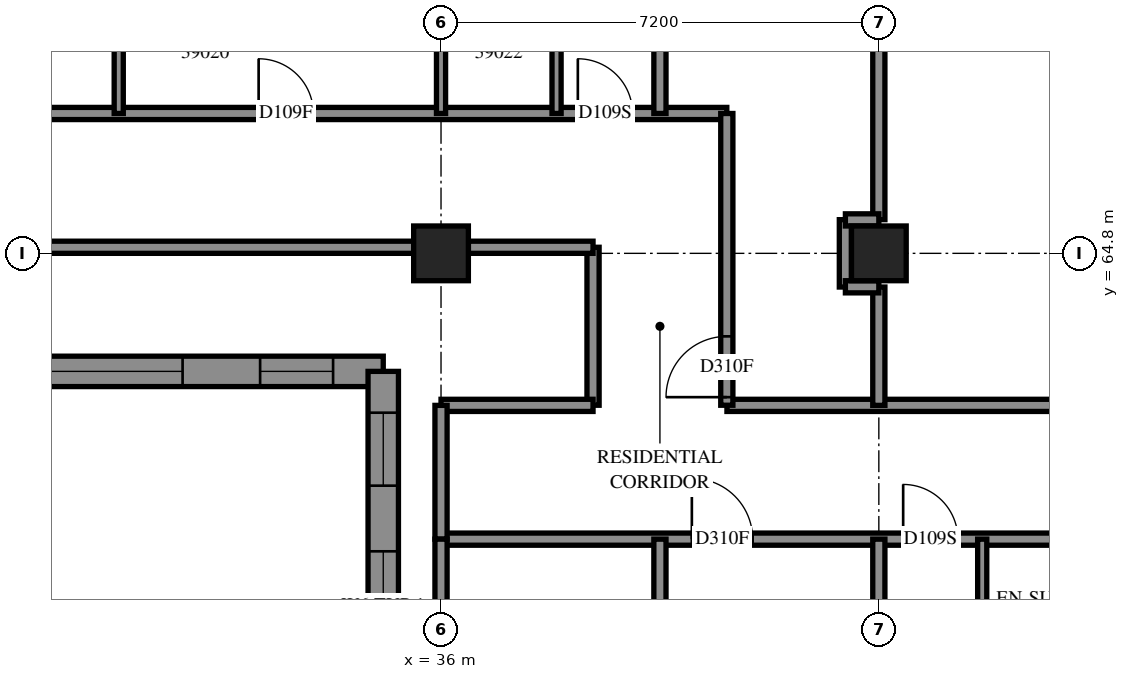
"""IFC4 building model, lengths in metres.
Left out: names, types, materials, properties, quantities, classifications, styles, units other than length and angle.
Written with IfcOpenShell. Run it as: python <this file> out.ifc"""

import sys

from ifc_helpers import new_model, si_unit, direction, frame, frame_2d, origin, origin_2d, place, context, subcontext, project, spatial, polyline, rectangle, outline, extrude, element, fill, save


model = new_model("IFC4")
c1 = context("Model", 3, precision=1e-05, world=origin(), true_north=direction((0.0, 1.0)))
c2 = subcontext(c1, "Body", "Model", "MODEL_VIEW")
j1 = project(units=[si_unit("LENGTHUNIT", "METRE"), si_unit("PLANEANGLEUNIT", "RADIAN")], contexts=[c1])
p1 = place(None, origin())
s1 = spatial("IfcSite", under=j1, at=p1, CompositionType="ELEMENT")
p2 = place(p1, origin())
s2 = spatial("IfcBuilding", under=s1, at=p2, CompositionType="ELEMENT")
p3 = place(p2, frame((0.0, 0.0, 145.6)))
s3 = spatial("IfcBuildingStorey", under=s2, at=p3, CompositionType="ELEMENT", Elevation=145.6)
for number, where, z_axis, x_axis in (
    (1, (36.0, 64.8, 0.0), (0.0, 0.0, 1.0), (1.0, 0.0, 0.0)),
    (2, (43.2, 64.8, 0.0), (0.0, 0.0, 1.0), (1.0, 0.0, 0.0)),
):
    element("IfcColumn", number, at=place(p3, frame(where, z_axis=z_axis, x_axis=x_axis)), inside=s3, PredefinedType="COLUMN", context=c2, shape_type="SweptSolid", body=[
        extrude(rectangle(XDim=0.9, YDim=0.9, at=origin_2d()), origin(), (0.0, 0.0, 1.0), 3.1),
    ])
p4 = place(p3, frame((19.659, 62.859, 0.0), z_axis=(0.0, 0.0, 1.0), x_axis=(1.0, 0.0, 0.0)))
e3 = element("IfcWall", 3, at=p4, inside=s3, PredefinedType="SOLIDWALL", context=c2, shape_type="SweptSolid", body=[
    extrude(outline(polyline([(-0.25, -0.25), (15.141, -0.25), (15.641, 0.25), (0.25, 0.25), (-0.25, -0.25)])), origin(), (0.0, 0.0, 1.0), 3.1),
])
p5 = place(p4, frame((2.341, 0.0, 0.45)))
e4 = element("IfcOpeningElement", 4, at=p5, cuts=e3, PredefinedType="OPENING", context=c2, shape_type="SweptSolid", body=[
    extrude(rectangle(XDim=2.8, YDim=2.5, at=frame_2d((1.4, 1.25))), frame((0.0, 0.26, 0.0), z_axis=(0.0, -1.0, 0.0), x_axis=(1.0, 0.0, 0.0)), (0.0, 0.0, 1.0), 0.52),
])
p6 = place(p4, frame((5.941, 0.0, 0.45)))
e5 = element("IfcOpeningElement", 5, at=p6, cuts=e3, PredefinedType="OPENING", context=c2, shape_type="SweptSolid", body=[
    extrude(rectangle(XDim=2.8, YDim=2.5, at=frame_2d((1.4, 1.25))), frame((0.0, 0.26, 0.0), z_axis=(0.0, -1.0, 0.0), x_axis=(1.0, 0.0, 0.0)), (0.0, 0.0, 1.0), 0.52),
])
p7 = place(p4, frame((9.291, 0.0, 0.45)))
e6 = element("IfcOpeningElement", 6, at=p7, cuts=e3, PredefinedType="OPENING", context=c2, shape_type="SweptSolid", body=[
    extrude(rectangle(XDim=2.8, YDim=2.5, at=frame_2d((1.4, 1.25))), frame((0.0, 0.26, 0.0), z_axis=(0.0, -1.0, 0.0), x_axis=(1.0, 0.0, 0.0)), (0.0, 0.0, 1.0), 0.52),
])
p8 = place(p4, frame((0.596, 0.0, 0.45)))
e7 = element("IfcOpeningElement", 7, at=p8, cuts=e3, PredefinedType="OPENING", context=c2, shape_type="SweptSolid", body=[
    extrude(rectangle(XDim=1.2, YDim=2.5, at=frame_2d((0.6, 1.25))), frame((0.0, 0.26, 0.0), z_axis=(0.0, -1.0, 0.0), x_axis=(1.0, 0.0, 0.0)), (0.0, 0.0, 1.0), 0.52),
])
p9 = place(p4, frame((13.366, 0.0, 0.45)))
e8 = element("IfcOpeningElement", 8, at=p9, cuts=e3, PredefinedType="OPENING", context=c2, shape_type="SweptSolid", body=[
    extrude(rectangle(XDim=1.2, YDim=2.5, at=frame_2d((0.6, 1.25))), frame((0.0, 0.26, 0.0), z_axis=(0.0, -1.0, 0.0), x_axis=(1.0, 0.0, 0.0)), (0.0, 0.0, 1.0), 0.52),
])
p10 = place(p3, frame((35.05, 62.859, 0.0), z_axis=(0.0, 0.0, 1.0), x_axis=(0.0, -1.0, 0.0)))
e9 = element("IfcWall", 9, at=p10, inside=s3, PredefinedType="SOLIDWALL", context=c2, shape_type="SweptSolid", body=[
    extrude(outline(polyline([(0.25, -0.25), (6.459, -0.25), (5.959, 0.25), (-0.25, 0.25), (0.25, -0.25)])), origin(), (0.0, 0.0, 1.0), 3.1),
])
p11 = place(p10, frame((0.679, 0.0, 0.45)))
e10 = element("IfcOpeningElement", 10, at=p11, cuts=e9, PredefinedType="OPENING", context=c2, shape_type="SweptSolid", body=[
    extrude(rectangle(XDim=1.2, YDim=2.5, at=frame_2d((0.6, 1.25))), frame((0.0, 0.26, 0.0), z_axis=(0.0, -1.0, 0.0), x_axis=(1.0, 0.0, 0.0)), (0.0, 0.0, 1.0), 0.52),
])
p12 = place(p10, frame((2.959, 0.0, 0.7)))
e11 = element("IfcOpeningElement", 11, at=p12, cuts=e9, PredefinedType="OPENING", context=c2, shape_type="SweptSolid", body=[
    extrude(rectangle(XDim=1.8, YDim=2.2, at=frame_2d((0.9, 1.1))), frame((0.0, 0.26, 0.0), z_axis=(0.0, -1.0, 0.0), x_axis=(1.0, 0.0, 0.0)), (0.0, 0.0, 1.0), 0.52),
])
p13 = place(p3, frame((21.602, 67.1, 0.0), z_axis=(0.0, 0.0, 1.0), x_axis=(1.0, 0.0, 0.0)))
e12 = element("IfcWall", 12, at=p13, inside=s3, PredefinedType="PARTITIONING", context=c2, shape_type="SweptSolid", body=[
    extrude(rectangle(XDim=19.098, YDim=0.2, at=frame_2d((9.549, 0.0))), origin(), (0.0, 0.0, 1.0), 3.1),
])
p14 = place(p13, frame((3.998, 0.0, 0.0)))
e13 = element("IfcOpeningElement", 13, at=p14, cuts=e12, PredefinedType="OPENING", context=c2, shape_type="SweptSolid", body=[
    extrude(rectangle(XDim=0.9, YDim=2.1, at=frame_2d((0.45, 1.05))), frame((0.0, 0.11, 0.0), z_axis=(0.0, -1.0, 0.0), x_axis=(1.0, 0.0, 0.0)), (0.0, 0.0, 1.0), 0.22),
])
p15 = place(p13, frame((11.399, 0.0, 0.0)))
e14 = element("IfcOpeningElement", 14, at=p15, cuts=e12, PredefinedType="OPENING", context=c2, shape_type="SweptSolid", body=[
    extrude(rectangle(XDim=0.9, YDim=2.1, at=frame_2d((0.45, 1.05))), frame((0.0, 0.11, 0.0), z_axis=(0.0, -1.0, 0.0), x_axis=(1.0, 0.0, 0.0)), (0.0, 0.0, 1.0), 0.22),
])
p16 = place(p13, frame((16.648, 0.0, 0.0)))
e15 = element("IfcOpeningElement", 15, at=p16, cuts=e12, PredefinedType="OPENING", context=c2, shape_type="SweptSolid", body=[
    extrude(rectangle(XDim=0.9, YDim=2.1, at=frame_2d((0.45, 1.05))), frame((0.0, 0.11, 0.0), z_axis=(0.0, -1.0, 0.0), x_axis=(1.0, 0.0, 0.0)), (0.0, 0.0, 1.0), 0.22),
])
p17 = place(p3, frame((36.0, 60.1, 0.0), z_axis=(0.0, 0.0, 1.0), x_axis=(1.0, 0.0, 0.0)))
e16 = element("IfcWall", 16, at=p17, inside=s3, PredefinedType="PARTITIONING", context=c2, shape_type="SweptSolid", body=[
    extrude(rectangle(XDim=16.9, YDim=0.2, at=frame_2d((8.45, 0.0))), origin(), (0.0, 0.0, 1.0), 3.1),
])
p18 = place(p17, frame((4.125, 0.0, 0.0)))
e17 = element("IfcOpeningElement", 17, at=p18, cuts=e16, PredefinedType="OPENING", context=c2, shape_type="SweptSolid", body=[
    extrude(rectangle(XDim=1.0, YDim=2.1, at=frame_2d((0.5, 1.05))), frame((0.0, 0.11, 0.0), z_axis=(0.0, -1.0, 0.0), x_axis=(1.0, 0.0, 0.0)), (0.0, 0.0, 1.0), 0.22),
])
p19 = place(p17, frame((7.6, 0.0, 0.0)))
e18 = element("IfcOpeningElement", 18, at=p19, cuts=e16, PredefinedType="OPENING", context=c2, shape_type="SweptSolid", body=[
    extrude(rectangle(XDim=0.9, YDim=2.1, at=frame_2d((0.45, 1.05))), frame((0.0, 0.11, 0.0), z_axis=(0.0, -1.0, 0.0), x_axis=(1.0, 0.0, 0.0)), (0.0, 0.0, 1.0), 0.22),
])
p20 = place(p17, frame((11.635, 0.0, 0.0)))
e19 = element("IfcOpeningElement", 19, at=p20, cuts=e16, PredefinedType="OPENING", context=c2, shape_type="SweptSolid", body=[
    extrude(rectangle(XDim=1.0, YDim=2.1, at=frame_2d((0.5, 1.05))), frame((0.0, 0.11, 0.0), z_axis=(0.0, -1.0, 0.0), x_axis=(1.0, 0.0, 0.0)), (0.0, 0.0, 1.0), 0.22),
])
p21 = place(p17, frame((15.652, 0.0, 0.0)))
e20 = element("IfcOpeningElement", 20, at=p21, cuts=e16, PredefinedType="OPENING", context=c2, shape_type="SweptSolid", body=[
    extrude(rectangle(XDim=1.0, YDim=2.1, at=frame_2d((0.5, 1.05))), frame((0.0, 0.11, 0.0), z_axis=(0.0, -1.0, 0.0), x_axis=(1.0, 0.0, 0.0)), (0.0, 0.0, 1.0), 0.22),
])
p22 = place(p3, frame((40.702, 62.3, 0.0), z_axis=(0.0, 0.0, 1.0), x_axis=(1.0, 0.0, 0.0)))
e21 = element("IfcWall", 21, at=p22, inside=s3, PredefinedType="PARTITIONING", context=c2, shape_type="SweptSolid", body=[
    extrude(rectangle(XDim=9.698, YDim=0.2, at=frame_2d((4.849, 0.0))), origin(), (0.0, 0.0, 1.0), 3.1),
])
p23 = place(p22, frame((6.198, 0.0, 0.0)))
e22 = element("IfcOpeningElement", 22, at=p23, cuts=e21, PredefinedType="OPENING", context=c2, shape_type="SweptSolid", body=[
    extrude(rectangle(XDim=1.0, YDim=2.1, at=frame_2d((0.5, 1.05))), frame((0.0, 0.11, 0.0), z_axis=(0.0, -1.0, 0.0), x_axis=(1.0, 0.0, 0.0)), (0.0, 0.0, 1.0), 0.22),
])
p24 = place(p3, frame((29.25, 64.9, 0.0), z_axis=(0.0, 0.0, 1.0), x_axis=(1.0, 0.0, 0.0)))
e23 = element("IfcWall", 23, at=p24, inside=s3, PredefinedType="PARTITIONING", context=c2, shape_type="SweptSolid", body=[
    extrude(rectangle(XDim=6.3, YDim=0.2, at=frame_2d((3.15, 0.0))), origin(), (0.0, 0.0, 1.0), 2.6),
])
p25 = place(p3, frame((43.2, 65.354, 0.0), z_axis=(0.0, 0.0, 1.0), x_axis=(0.0, 1.0, 0.0)))
e24 = element("IfcWall", 24, at=p25, inside=s3, PredefinedType="PARTITIONING", context=c2, shape_type="SweptSolid", body=[
    extrude(rectangle(XDim=6.092, YDim=0.2, at=frame_2d((3.046, 0.0))), origin(), (0.0, 0.0, 1.0), 3.1),
])
p26 = place(p3, frame((39.6, 67.1, 0.0), z_axis=(0.0, 0.0, 1.0), x_axis=(0.0, 1.0, 0.0)))
e25 = element("IfcWall", 25, at=p26, inside=s3, PredefinedType="PARTITIONING", context=c2, shape_type="SweptSolid", body=[
    extrude(rectangle(XDim=5.723, YDim=0.2, at=frame_2d((2.862, 0.0))), origin(), (0.0, 0.0, 1.0), 3.1),
])
p27 = place(p3, frame((40.7, 62.302, 0.0), z_axis=(0.0, 0.0, 1.0), x_axis=(0.0, 1.0, 0.0)))
e26 = element("IfcWall", 26, at=p27, inside=s3, PredefinedType="PARTITIONING", context=c2, shape_type="SweptSolid", body=[
    extrude(rectangle(XDim=4.798, YDim=0.2, at=frame_2d((2.399, 0.0))), origin(), (0.0, 0.0, 1.0), 3.1),
])
p28 = place(p27, frame((0.133, 0.0, 0.0)))
e27 = element("IfcOpeningElement", 27, at=p28, cuts=e26, PredefinedType="OPENING", context=c2, shape_type="SweptSolid", body=[
    extrude(rectangle(XDim=1.0, YDim=2.1, at=frame_2d((0.5, 1.05))), frame((0.0, 0.11, 0.0), z_axis=(0.0, -1.0, 0.0), x_axis=(1.0, 0.0, 0.0)), (0.0, 0.0, 1.0), 0.22),
])
p29 = place(p3, frame((39.6, 56.9, 0.0), z_axis=(0.0, 0.0, 1.0), x_axis=(0.0, 1.0, 0.0)))
e28 = element("IfcWall", 28, at=p29, inside=s3, PredefinedType="PARTITIONING", context=c2, shape_type="SweptSolid", body=[
    extrude(rectangle(XDim=3.2, YDim=0.2, at=frame_2d((1.6, 0.0))), origin(), (0.0, 0.0, 1.0), 3.1),
])
p30 = place(p3, frame((38.5, 62.302, 0.0), z_axis=(0.0, 0.0, 1.0), x_axis=(0.0, 1.0, 0.0)))
e29 = element("IfcWall", 29, at=p30, inside=s3, PredefinedType="PARTITIONING", context=c2, shape_type="SweptSolid", body=[
    extrude(rectangle(XDim=2.598, YDim=0.2, at=frame_2d((1.299, 0.0))), origin(), (0.0, 0.0, 1.0), 3.1),
])
p31 = place(p3, frame((36.0, 62.3, 0.0), z_axis=(0.0, 0.0, 1.0), x_axis=(1.0, 0.0, 0.0)))
e30 = element("IfcWall", 30, at=p31, inside=s3, PredefinedType="PARTITIONING", context=c2, shape_type="SweptSolid", body=[
    extrude(rectangle(XDim=2.5, YDim=0.2, at=frame_2d((1.25, 0.0))), origin(), (0.0, 0.0, 1.0), 3.1),
])
for number, where, z_axis, x_axis in (
    (31, (30.7, 67.1, 0.0), (0.0, 0.0, 1.0), (0.0, 1.0, 0.0)),
    (32, (36.0, 67.1, 0.0), (0.0, 0.0, 1.0), (0.0, 1.0, 0.0)),
    (33, (37.9, 67.1, 0.0), (0.0, 0.0, 1.0), (0.0, 1.0, 0.0)),
    (34, (44.9, 57.7, 0.0), (0.0, 0.0, 1.0), (0.0, 1.0, 0.0)),
):
    element("IfcWall", number, at=place(p3, frame(where, z_axis=z_axis, x_axis=x_axis)), inside=s3, PredefinedType="PARTITIONING", context=c2, shape_type="SweptSolid", body=[
        extrude(rectangle(XDim=2.4, YDim=0.15, at=frame_2d((1.2, 0.0))), origin(), (0.0, 0.0, 1.0), 3.1),
    ])
p32 = place(p3, frame((36.0, 60.1, 0.0), z_axis=(0.0, 0.0, 1.0), x_axis=(0.0, 1.0, 0.0)))
e35 = element("IfcWall", 35, at=p32, inside=s3, PredefinedType="PARTITIONING", context=c2, shape_type="SweptSolid", body=[
    extrude(rectangle(XDim=2.2, YDim=0.2, at=frame_2d((1.1, 0.0))), origin(), (0.0, 0.0, 1.0), 2.6),
])
p33 = place(p3, frame((36.0, 58.05, 0.0), z_axis=(0.0, 0.0, 1.0), x_axis=(0.0, 1.0, 0.0)))
e36 = element("IfcWall", 36, at=p33, inside=s3, PredefinedType="PARTITIONING", context=c2, shape_type="SweptSolid", body=[
    extrude(rectangle(XDim=2.05, YDim=0.2, at=frame_2d((1.025, 0.0))), origin(), (0.0, 0.0, 1.0), 2.6),
])
for number, where, z_axis, x_axis in (
    (37, (43.2, 58.05, 0.0), (0.0, 0.0, 1.0), (0.0, 1.0, 0.0)),
    (38, (36.45, 64.9, 0.0), (0.0, 0.0, 1.0), (1.0, 0.0, 0.0)),
):
    element("IfcWall", number, at=place(p3, frame(where, z_axis=z_axis, x_axis=x_axis)), inside=s3, PredefinedType="PARTITIONING", context=c2, shape_type="SweptSolid", body=[
        extrude(rectangle(XDim=2.05, YDim=0.2, at=frame_2d((1.025, 0.0))), origin(), (0.0, 0.0, 1.0), 3.1),
    ])
p34 = place(p3, frame((43.2, 62.3, 0.0), z_axis=(0.0, 0.0, 1.0), x_axis=(0.0, 1.0, 0.0)))
e39 = element("IfcWall", 39, at=p34, inside=s3, PredefinedType="PARTITIONING", context=c2, shape_type="SweptSolid", body=[
    extrude(rectangle(XDim=1.946, YDim=0.2, at=frame_2d((0.973, 0.0))), origin(), (0.0, 0.0, 1.0), 3.1),
])
p35 = place(p3, frame((42.65, 64.246, 0.0), z_axis=(0.0, 0.0, 1.0), x_axis=(0.0, 1.0, 0.0)))
e40 = element("IfcWall", 40, at=p35, inside=s3, PredefinedType="PARTITIONING", context=c2, shape_type="SweptSolid", body=[
    extrude(rectangle(XDim=1.108, YDim=0.2, at=frame_2d((0.554, 0.0))), origin(), (0.0, 0.0, 1.0), 3.1),
])
for number, where, z_axis, x_axis in (
    (41, (42.65, 65.35, 0.0), (0.0, 0.0, 1.0), (1.0, 0.0, 0.0)),
    (42, (42.65, 64.25, 0.0), (0.0, 0.0, 1.0), (1.0, 0.0, 0.0)),
):
    element("IfcWall", number, at=place(p3, frame(where, z_axis=z_axis, x_axis=x_axis)), inside=s3, PredefinedType="PARTITIONING", context=c2, shape_type="SweptSolid", body=[
        extrude(rectangle(XDim=0.55, YDim=0.2, at=frame_2d((0.275, 0.0))), origin(), (0.0, 0.0, 1.0), 3.1),
    ])
p36 = place(p7, origin())
e43 = element("IfcWindow", 43, at=p36, inside=s3, PartitioningType="SINGLE_PANEL", PredefinedType="WINDOW", context=c2, shape_type="SweptSolid", body=[
    extrude(rectangle(XDim=2.8, YDim=2.5, at=frame_2d((1.4, 1.25))), frame((0.0, 0.18, 0.0), z_axis=(0.0, -1.0, 0.0), x_axis=(1.0, 0.0, 0.0)), (0.0, 0.0, 1.0), 0.06),
])
fill(e6, e43)
p37 = place(p9, origin())
e44 = element("IfcWindow", 44, at=p37, inside=s3, PartitioningType="SINGLE_PANEL", PredefinedType="WINDOW", context=c2, shape_type="SweptSolid", body=[
    extrude(rectangle(XDim=1.2, YDim=2.5, at=frame_2d((0.6, 1.25))), frame((0.0, 0.18, 0.0), z_axis=(0.0, -1.0, 0.0), x_axis=(1.0, 0.0, 0.0)), (0.0, 0.0, 1.0), 0.06),
])
fill(e8, e44)
p38 = place(p11, origin())
e45 = element("IfcWindow", 45, at=p38, inside=s3, PartitioningType="SINGLE_PANEL", PredefinedType="WINDOW", context=c2, shape_type="SweptSolid", body=[
    extrude(rectangle(XDim=1.2, YDim=2.5, at=frame_2d((0.6, 1.25))), frame((0.0, 0.18, 0.0), z_axis=(0.0, -1.0, 0.0), x_axis=(1.0, 0.0, 0.0)), (0.0, 0.0, 1.0), 0.06),
])
fill(e10, e45)
p39 = place(p15, origin())
e46 = element("IfcDoor", 46, at=p39, inside=s3, OperationType="SINGLE_SWING_RIGHT", PredefinedType="DOOR", context=c2, shape_type="SweptSolid", body=[
    extrude(rectangle(XDim=0.9, YDim=2.1, at=frame_2d((0.45, 1.05))), frame((0.0, 0.025, 0.0), z_axis=(0.0, -1.0, 0.0), x_axis=(1.0, 0.0, 0.0)), (0.0, 0.0, 1.0), 0.05),
])
fill(e14, e46)
p40 = place(p16, origin())
e47 = element("IfcDoor", 47, at=p40, inside=s3, OperationType="SINGLE_SWING_RIGHT", PredefinedType="DOOR", context=c2, shape_type="SweptSolid", body=[
    extrude(rectangle(XDim=0.9, YDim=2.1, at=frame_2d((0.45, 1.05))), frame((0.0, 0.025, 0.0), z_axis=(0.0, -1.0, 0.0), x_axis=(1.0, 0.0, 0.0)), (0.0, 0.0, 1.0), 0.05),
])
fill(e15, e47)
p41 = place(p18, origin())
e48 = element("IfcDoor", 48, at=p41, inside=s3, OperationType="SINGLE_SWING_RIGHT", PredefinedType="DOOR", context=c2, shape_type="SweptSolid", body=[
    extrude(rectangle(XDim=1.0, YDim=2.1, at=frame_2d((0.5, 1.05))), frame((0.0, 0.025, 0.0), z_axis=(0.0, -1.0, 0.0), x_axis=(1.0, 0.0, 0.0)), (0.0, 0.0, 1.0), 0.05),
])
fill(e17, e48)
p42 = place(p19, origin())
e49 = element("IfcDoor", 49, at=p42, inside=s3, OperationType="SINGLE_SWING_LEFT", PredefinedType="DOOR", context=c2, shape_type="SweptSolid", body=[
    extrude(rectangle(XDim=0.9, YDim=2.1, at=frame_2d((0.45, 1.05))), frame((0.0, 0.025, 0.0), z_axis=(0.0, -1.0, 0.0), x_axis=(1.0, 0.0, 0.0)), (0.0, 0.0, 1.0), 0.05),
])
fill(e18, e49)
p43 = place(p28, origin())
e50 = element("IfcDoor", 50, at=p43, inside=s3, OperationType="SINGLE_SWING_LEFT", PredefinedType="DOOR", context=c2, shape_type="SweptSolid", body=[
    extrude(rectangle(XDim=1.0, YDim=2.1, at=frame_2d((0.5, 1.05))), frame((0.0, 0.025, 0.0), z_axis=(0.0, -1.0, 0.0), x_axis=(1.0, 0.0, 0.0)), (0.0, 0.0, 1.0), 0.05),
])
fill(e27, e50)
p44 = place(p12, origin())
e51 = element("IfcWindow", 51, at=p44, inside=s3, PartitioningType="SINGLE_PANEL", PredefinedType="WINDOW", context=c2, shape_type="SweptSolid", body=[
    extrude(rectangle(XDim=1.8, YDim=2.2, at=frame_2d((0.9, 1.1))), frame((0.0, 0.18, 0.0), z_axis=(0.0, -1.0, 0.0), x_axis=(1.0, 0.0, 0.0)), (0.0, 0.0, 1.0), 0.06),
])
fill(e11, e51)
save(model, sys.argv[1])
